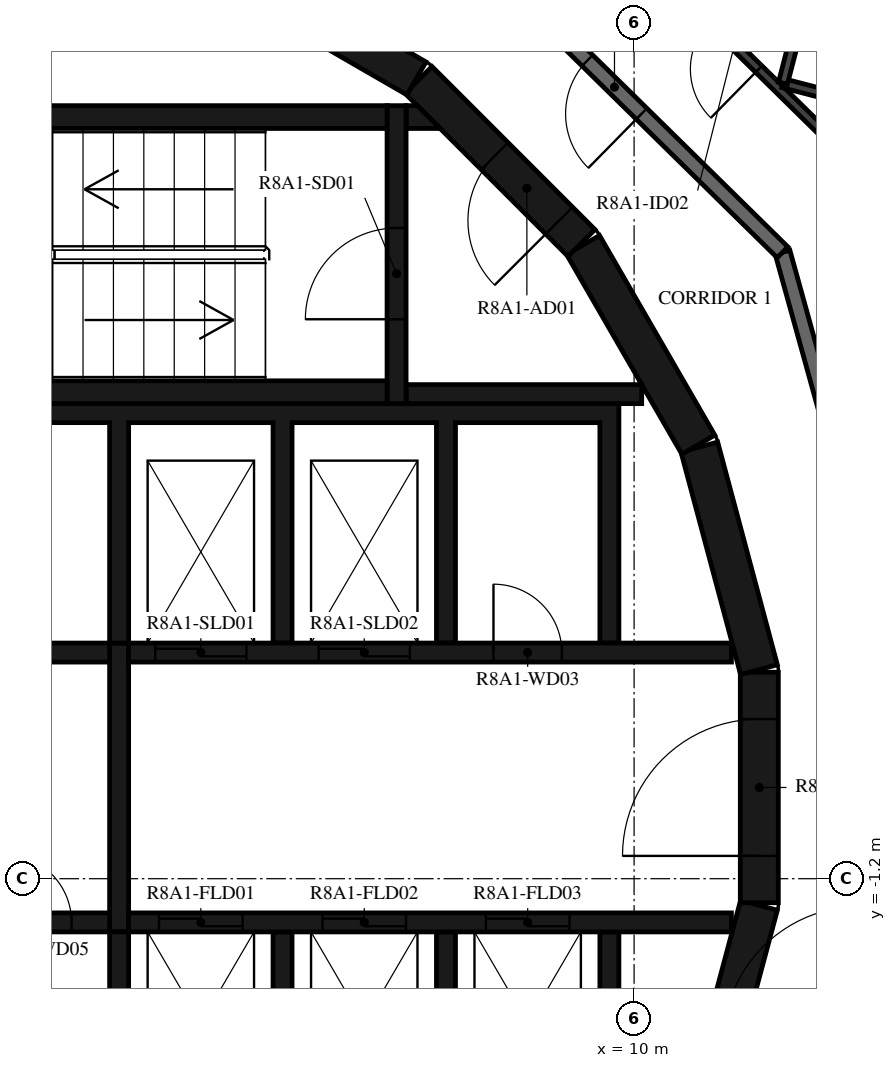
"""IFC4 building model, lengths in metres.
Left out: names, types, materials, properties, quantities, classifications, styles, units other than length and angle.
Written with IfcOpenShell. Run it as: python <this file> out.ifc"""

import sys

from ifc_helpers import new_model, si_unit, direction, frame, frame_2d, origin, place, context, subcontext, project, spatial, polyline, rectangle, outline, extrude, element, fill, save


model = new_model("IFC4")
c1 = context("Model", 3, precision=1e-05, world=origin(), true_north=direction((0.0, 1.0)))
c2 = subcontext(c1, "Body", "Model", "MODEL_VIEW")
j1 = project(units=[si_unit("LENGTHUNIT", "METRE"), si_unit("PLANEANGLEUNIT", "RADIAN")], contexts=[c1])
p1 = place(None, origin())
s1 = spatial("IfcSite", under=j1, at=p1, CompositionType="ELEMENT")
p2 = place(p1, origin())
s2 = spatial("IfcBuilding", under=s1, at=p2, CompositionType="ELEMENT")
p3 = place(p2, frame((0.0, 0.0, 301.7)))
s3 = spatial("IfcBuildingStorey", under=s2, at=p3, CompositionType="ELEMENT", Elevation=301.7)
p4 = place(p3, frame((10.858, -4.479, 0.0), z_axis=(0.0, 0.0, 1.0), x_axis=(0.258734743916, 0.965948410781, 0.0)))
e1 = element("IfcWall", 1, at=p4, inside=s3, PredefinedType="SHEAR", context=c2, shape_type="SweptSolid", body=[
    extrude(rectangle(XDim=3.033, YDim=0.5, at=frame_2d((1.516, 0.0))), origin(), (0.0, 0.0, 1.0), 3.12),
])
p5 = place(p3, frame((11.647, -1.516, 0.0), z_axis=(0.0, 0.0, 1.0), x_axis=(0.0, 1.0, 0.0)))
e2 = element("IfcWall", 2, at=p5, inside=s3, PredefinedType="SHEAR", context=c2, shape_type="SweptSolid", body=[
    extrude(rectangle(XDim=3.033, YDim=0.5, at=frame_2d((1.516, 0.0))), origin(), (0.0, 0.0, 1.0), 3.12),
])
p6 = place(p5, frame((0.616, 0.0, 0.0)))
e3 = element("IfcOpeningElement", 3, at=p6, cuts=e2, PredefinedType="OPENING", context=c2, shape_type="SweptSolid", body=[
    extrude(rectangle(XDim=1.8, YDim=2.1, at=frame_2d((0.9, 1.05))), frame((0.0, 0.26, 0.0), z_axis=(0.0, -1.0, 0.0), x_axis=(1.0, 0.0, 0.0)), (0.0, 0.0, 1.0), 0.52),
])
for number, where, z_axis, x_axis in (
    (4, (11.643, 1.55, 0.0), (0.0, 0.0, 1.0), (-0.259, 0.966, 0.0)),
    (5, (10.845, 4.51, 0.0), (0.0, 0.0, 1.0), (-0.5, 0.866, 0.0)),
):
    element("IfcWall", number, at=place(p3, frame(where, z_axis=z_axis, x_axis=x_axis)), inside=s3, PredefinedType="SHEAR", context=c2, shape_type="SweptSolid", body=[
        extrude(rectangle(XDim=3.033, YDim=0.5, at=frame_2d((1.516, 0.0))), origin(), (0.0, 0.0, 1.0), 3.12),
    ])
p7 = place(p3, frame((9.308, 7.164, 0.0), z_axis=(0.0, 0.0, 1.0), x_axis=(-0.707106781187, 0.707106781187, 0.0)))
e6 = element("IfcWall", 6, at=p7, inside=s3, PredefinedType="SHEAR", context=c2, shape_type="SweptSolid", body=[
    extrude(rectangle(XDim=3.032, YDim=0.5, at=frame_2d((1.516, 0.0))), origin(), (0.0, 0.0, 1.0), 3.12),
])
p8 = place(p7, frame((0.416, 0.0, 0.0)))
e7 = element("IfcOpeningElement", 7, at=p8, cuts=e6, PredefinedType="OPENING", context=c2, shape_type="SweptSolid", body=[
    extrude(rectangle(XDim=1.2, YDim=2.1, at=frame_2d((0.6, 1.05))), frame((0.0, 0.26, 0.0), z_axis=(0.0, -1.0, 0.0), x_axis=(1.0, 0.0, 0.0)), (0.0, 0.0, 1.0), 0.52),
])
p9 = place(p3, frame((7.137, 9.329, 0.0), z_axis=(0.0, 0.0, 1.0), x_axis=(-0.865975092491, 0.500087131594, 0.0)))
e8 = element("IfcWall", 8, at=p9, inside=s3, PredefinedType="SHEAR", context=c2, shape_type="SweptSolid", body=[
    extrude(rectangle(XDim=3.033, YDim=0.5, at=frame_2d((1.516, 0.0))), origin(), (0.0, 0.0, 1.0), 3.12),
])
for number, where, z_axis, x_axis in (
    (9, (0.0, 5.2, 0.0), (0.0, 0.0, 1.0), (1.0, 0.0, 0.0)),
    (10, (0.0, 8.82, 0.0), (0.0, 0.0, 1.0), (1.0, 0.0, 0.0)),
):
    element("IfcWall", number, at=place(p3, frame(where, z_axis=z_axis, x_axis=x_axis)), inside=s3, PredefinedType="SHEAR", context=c2, shape_type="SweptSolid", body=[
        extrude(rectangle(XDim=6.75, YDim=0.3, at=frame_2d((3.375, 0.0))), origin(), (0.0, 0.0, 1.0), 3.12),
    ])
p10 = place(p3, frame((6.875, 5.05, 0.0), z_axis=(0.0, 0.0, 1.0), x_axis=(0.0, 1.0, 0.0)))
e11 = element("IfcWall", 11, at=p10, inside=s3, PredefinedType="SHEAR", context=c2, shape_type="SweptSolid", body=[
    extrude(rectangle(XDim=3.92, YDim=0.25, at=frame_2d((1.96, 0.0))), origin(), (0.0, 0.0, 1.0), 3.12),
])
p11 = place(p10, frame((1.11, 0.0, 0.0)))
e12 = element("IfcOpeningElement", 12, at=p11, cuts=e11, PredefinedType="OPENING", context=c2, shape_type="SweptSolid", body=[
    extrude(rectangle(XDim=1.2, YDim=2.1, at=frame_2d((0.6, 1.05))), frame((0.0, 0.135, 0.0), z_axis=(0.0, -1.0, 0.0), x_axis=(1.0, 0.0, 0.0)), (0.0, 0.0, 1.0), 0.27),
])
p12 = place(p3, frame((7.0, 5.175, 0.0), z_axis=(0.0, 0.0, 1.0), x_axis=(1.0, 0.0, 0.0)))
e13 = element("IfcWall", 13, at=p12, inside=s3, PredefinedType="SHEAR", context=c2, shape_type="SweptSolid", body=[
    extrude(rectangle(XDim=3.1, YDim=0.25, at=frame_2d((1.55, 0.0))), origin(), (0.0, 0.0, 1.0), 3.12),
])
p13 = place(p3, origin())
e14 = element("IfcWall", 14, at=p13, inside=s3, PredefinedType="SHEAR", context=c2, shape_type="SweptSolid", body=[
    extrude(outline(polyline([(7.448, 8.67), (7.0, 8.67), (7.0, 8.97), (7.148, 8.97), (7.448, 8.67)])), origin(), (0.0, 0.0, 1.0), 3.12),
])
p14 = place(p3, origin())
e15 = element("IfcWall", 15, at=p14, inside=s3, PredefinedType="SHEAR", context=c2, shape_type="SweptSolid", body=[
    extrude(outline(polyline([(-9.8, 1.9), (-9.55, 1.9), (-9.55, 4.8), (-1.2, 4.8), (-1.2, 1.9), (-0.95, 1.9), (-0.95, 4.8), (3.1, 4.8), (3.1, 1.9), (3.35, 1.9), (3.35, 4.8), (5.25, 4.8), (5.25, 1.9), (5.5, 1.9), (5.5, 4.8), (7.4, 4.8), (7.4, 1.9), (7.65, 1.9), (7.65, 4.8), (9.55, 4.8), (9.55, 1.9), (9.8, 1.9), (9.8, 4.8), (9.8, 5.05), (-9.8, 5.05), (-9.8, 4.8), (-9.8, 1.9)])), origin(), (0.0, 0.0, 1.0), 3.12),
])
p15 = place(p3, origin())
e16 = element("IfcWall", 16, at=p15, inside=s3, PredefinedType="SHEAR", context=c2, shape_type="SweptSolid", body=[
    extrude(outline(polyline([(9.8, -5.05), (9.8, -4.8), (9.8, -1.9), (9.55, -1.9), (9.55, -4.8), (7.65, -4.8), (7.65, -1.9), (7.4, -1.9), (7.4, -4.8), (5.5, -4.8), (5.5, -1.9), (5.25, -1.9), (5.25, -4.8), (3.35, -4.8), (3.35, -1.9), (3.1, -1.9), (3.1, -4.8), (1.2, -4.8), (1.2, -1.9), (0.95, -1.9), (0.95, -4.8), (-0.95, -4.8), (-0.95, -1.9), (-1.2, -1.9), (-1.2, -4.8), (-3.1, -4.8), (-3.1, -1.9), (-3.35, -1.9), (-3.35, -4.8), (-5.25, -4.8), (-5.25, -1.9), (-5.5, -1.9), (-5.5, -4.8), (-9.55, -4.8), (-9.55, -1.9), (-9.8, -1.9), (-9.8, -4.8), (-9.8, -5.05), (9.8, -5.05)])), origin(), (0.0, 0.0, 1.0), 3.12),
])
p16 = place(p3, frame((-11.28, 1.775, 0.0), z_axis=(0.0, 0.0, 1.0), x_axis=(1.0, 0.0, 0.0)))
e17 = element("IfcWall", 17, at=p16, inside=s3, PredefinedType="SHEAR", context=c2, shape_type="SweptSolid", body=[
    extrude(rectangle(XDim=14.38, YDim=0.25, at=frame_2d((7.19, 0.0))), origin(), (0.0, 0.0, 1.0), 3.12),
])
p17 = place(p16, frame((5.455, 0.0, 0.0)))
e18 = element("IfcOpeningElement", 18, at=p17, cuts=e17, PredefinedType="OPENING", context=c2, shape_type="SweptSolid", body=[
    extrude(rectangle(XDim=0.9, YDim=2.1, at=frame_2d((0.45, 1.05))), frame((0.0, 0.135, 0.0), z_axis=(0.0, -1.0, 0.0), x_axis=(1.0, 0.0, 0.0)), (0.0, 0.0, 1.0), 0.27),
])
p18 = place(p16, frame((11.905, 0.0, 0.0)))
e19 = element("IfcOpeningElement", 19, at=p18, cuts=e17, PredefinedType="OPENING", context=c2, shape_type="SweptSolid", body=[
    extrude(rectangle(XDim=0.9, YDim=2.1, at=frame_2d((0.45, 1.05))), frame((0.0, 0.135, 0.0), z_axis=(0.0, -1.0, 0.0), x_axis=(1.0, 0.0, 0.0)), (0.0, 0.0, 1.0), 0.27),
])
p19 = place(p3, frame((3.35, 1.775, 0.0), z_axis=(0.0, 0.0, 1.0), x_axis=(1.0, 0.0, 0.0)))
e20 = element("IfcWall", 20, at=p19, inside=s3, PredefinedType="SHEAR", context=c2, shape_type="SweptSolid", body=[
    extrude(rectangle(XDim=7.93, YDim=0.25, at=frame_2d((3.965, 0.0))), origin(), (0.0, 0.0, 1.0), 3.12),
])
p20 = place(p19, frame((0.35, 0.0, 0.0)))
e21 = element("IfcOpeningElement", 21, at=p20, cuts=e20, PredefinedType="OPENING", context=c2, shape_type="SweptSolid", body=[
    extrude(rectangle(XDim=1.2, YDim=2.4, at=frame_2d((0.6, 1.2))), frame((0.0, 0.135, 0.0), z_axis=(0.0, -1.0, 0.0), x_axis=(1.0, 0.0, 0.0)), (0.0, 0.0, 1.0), 0.27),
])
p21 = place(p19, frame((2.5, 0.0, 0.0)))
e22 = element("IfcOpeningElement", 22, at=p21, cuts=e20, PredefinedType="OPENING", context=c2, shape_type="SweptSolid", body=[
    extrude(rectangle(XDim=1.2, YDim=2.4, at=frame_2d((0.6, 1.2))), frame((0.0, 0.135, 0.0), z_axis=(0.0, -1.0, 0.0), x_axis=(1.0, 0.0, 0.0)), (0.0, 0.0, 1.0), 0.27),
])
p22 = place(p19, frame((4.8, 0.0, 0.0)))
e23 = element("IfcOpeningElement", 23, at=p22, cuts=e20, PredefinedType="OPENING", context=c2, shape_type="SweptSolid", body=[
    extrude(rectangle(XDim=0.9, YDim=2.1, at=frame_2d((0.45, 1.05))), frame((0.0, 0.135, 0.0), z_axis=(0.0, -1.0, 0.0), x_axis=(1.0, 0.0, 0.0)), (0.0, 0.0, 1.0), 0.27),
])
p23 = place(p3, frame((-11.28, -1.775, 0.0), z_axis=(0.0, 0.0, 1.0), x_axis=(1.0, 0.0, 0.0)))
e24 = element("IfcWall", 24, at=p23, inside=s3, PredefinedType="SHEAR", context=c2, shape_type="SweptSolid", body=[
    extrude(rectangle(XDim=14.38, YDim=0.25, at=frame_2d((7.19, 0.0))), origin(), (0.0, 0.0, 1.0), 3.12),
])
p24 = place(p23, frame((6.43, 0.0, 0.0)))
e25 = element("IfcOpeningElement", 25, at=p24, cuts=e24, PredefinedType="OPENING", context=c2, shape_type="SweptSolid", body=[
    extrude(rectangle(XDim=1.1, YDim=2.1, at=frame_2d((0.55, 1.05))), frame((0.0, 0.135, 0.0), z_axis=(0.0, -1.0, 0.0), x_axis=(1.0, 0.0, 0.0)), (0.0, 0.0, 1.0), 0.27),
])
p25 = place(p23, frame((8.58, 0.0, 0.0)))
e26 = element("IfcOpeningElement", 26, at=p25, cuts=e24, PredefinedType="OPENING", context=c2, shape_type="SweptSolid", body=[
    extrude(rectangle(XDim=1.1, YDim=2.1, at=frame_2d((0.55, 1.05))), frame((0.0, 0.135, 0.0), z_axis=(0.0, -1.0, 0.0), x_axis=(1.0, 0.0, 0.0)), (0.0, 0.0, 1.0), 0.27),
])
p26 = place(p23, frame((10.73, 0.0, 0.0)))
e27 = element("IfcOpeningElement", 27, at=p26, cuts=e24, PredefinedType="OPENING", context=c2, shape_type="SweptSolid", body=[
    extrude(rectangle(XDim=1.1, YDim=2.1, at=frame_2d((0.55, 1.05))), frame((0.0, 0.135, 0.0), z_axis=(0.0, -1.0, 0.0), x_axis=(1.0, 0.0, 0.0)), (0.0, 0.0, 1.0), 0.27),
])
p27 = place(p23, frame((3.305, 0.0, 0.0)))
e28 = element("IfcOpeningElement", 28, at=p27, cuts=e24, PredefinedType="OPENING", context=c2, shape_type="SweptSolid", body=[
    extrude(rectangle(XDim=0.9, YDim=2.1, at=frame_2d((0.45, 1.05))), frame((0.0, 0.135, 0.0), z_axis=(0.0, -1.0, 0.0), x_axis=(1.0, 0.0, 0.0)), (0.0, 0.0, 1.0), 0.27),
])
p28 = place(p23, frame((12.98, 0.0, 0.0)))
e29 = element("IfcOpeningElement", 29, at=p28, cuts=e24, PredefinedType="OPENING", context=c2, shape_type="SweptSolid", body=[
    extrude(rectangle(XDim=0.9, YDim=2.1, at=frame_2d((0.45, 1.05))), frame((0.0, 0.135, 0.0), z_axis=(0.0, -1.0, 0.0), x_axis=(1.0, 0.0, 0.0)), (0.0, 0.0, 1.0), 0.27),
])
p29 = place(p3, frame((3.35, -1.775, 0.0), z_axis=(0.0, 0.0, 1.0), x_axis=(1.0, 0.0, 0.0)))
e30 = element("IfcWall", 30, at=p29, inside=s3, PredefinedType="SHEAR", context=c2, shape_type="SweptSolid", body=[
    extrude(rectangle(XDim=7.93, YDim=0.25, at=frame_2d((3.965, 0.0))), origin(), (0.0, 0.0, 1.0), 3.12),
])
p30 = place(p29, frame((0.4, 0.0, 0.0)))
e31 = element("IfcOpeningElement", 31, at=p30, cuts=e30, PredefinedType="OPENING", context=c2, shape_type="SweptSolid", body=[
    extrude(rectangle(XDim=1.1, YDim=2.4, at=frame_2d((0.55, 1.2))), frame((0.0, 0.135, 0.0), z_axis=(0.0, -1.0, 0.0), x_axis=(1.0, 0.0, 0.0)), (0.0, 0.0, 1.0), 0.27),
])
p31 = place(p29, frame((2.55, 0.0, 0.0)))
e32 = element("IfcOpeningElement", 32, at=p31, cuts=e30, PredefinedType="OPENING", context=c2, shape_type="SweptSolid", body=[
    extrude(rectangle(XDim=1.1, YDim=2.4, at=frame_2d((0.55, 1.2))), frame((0.0, 0.135, 0.0), z_axis=(0.0, -1.0, 0.0), x_axis=(1.0, 0.0, 0.0)), (0.0, 0.0, 1.0), 0.27),
])
p32 = place(p29, frame((4.7, 0.0, 0.0)))
e33 = element("IfcOpeningElement", 33, at=p32, cuts=e30, PredefinedType="OPENING", context=c2, shape_type="SweptSolid", body=[
    extrude(rectangle(XDim=1.1, YDim=2.4, at=frame_2d((0.55, 1.2))), frame((0.0, 0.135, 0.0), z_axis=(0.0, -1.0, 0.0), x_axis=(1.0, 0.0, 0.0)), (0.0, 0.0, 1.0), 0.27),
])
p33 = place(p3, frame((3.225, -1.9, 0.0), z_axis=(0.0, 0.0, 1.0), x_axis=(0.0, 1.0, 0.0)))
e34 = element("IfcWall", 34, at=p33, inside=s3, PredefinedType="SHEAR", context=c2, shape_type="SweptSolid", body=[
    extrude(rectangle(XDim=3.8, YDim=0.25, at=frame_2d((1.9, 0.0))), origin(), (0.0, 0.0, 1.0), 3.12),
])
p34 = place(p3, frame((12.074, -6.831, 0.0), z_axis=(0.0, 0.0, 1.0), x_axis=(0.250391063186, 0.968144780225, 0.0)))
e35 = element("IfcWall", 35, at=p34, inside=s3, PredefinedType="STANDARD", context=c2, shape_type="SweptSolid", body=[
    extrude(rectangle(XDim=7.181, YDim=0.2, at=frame_2d((3.591, 0.0))), origin(), (0.0, 0.0, 1.0), 3.12),
])
p35 = place(p34, frame((3.581, 0.0, 0.0)))
e36 = element("IfcOpeningElement", 36, at=p35, cuts=e35, PredefinedType="OPENING", context=c2, shape_type="SweptSolid", body=[
    extrude(rectangle(XDim=1.8, YDim=2.1, at=frame_2d((0.9, 1.05))), frame((0.0, 0.11, 0.0), z_axis=(0.0, -1.0, 0.0), x_axis=(1.0, 0.0, 0.0)), (0.0, 0.0, 1.0), 0.22),
])
p36 = place(p3, frame((12.913, 3.581, 0.0), z_axis=(0.0, 0.0, 1.0), x_axis=(-0.267223005422, 0.963634715737, 0.0)))
e37 = element("IfcWall", 37, at=p36, inside=s3, PredefinedType="STANDARD", context=c2, shape_type="SweptSolid", body=[
    extrude(rectangle(XDim=3.591, YDim=0.2, at=frame_2d((1.795, 0.0))), origin(), (0.0, 0.0, 1.0), 3.12),
])
p37 = place(p3, frame((11.953, 7.041, 0.0), z_axis=(0.0, 0.0, 1.0), x_axis=(-0.713250549143, 0.70090916255, 0.0)))
e38 = element("IfcWall", 38, at=p37, inside=s3, PredefinedType="STANDARD", context=c2, shape_type="SweptSolid", body=[
    extrude(rectangle(XDim=7.181, YDim=0.2, at=frame_2d((3.59, 0.0))), origin(), (0.0, 0.0, 1.0), 3.12),
])
p38 = place(p37, frame((2.6, 0.0, 0.0)))
e39 = element("IfcOpeningElement", 39, at=p38, cuts=e38, PredefinedType="OPENING", context=c2, shape_type="SweptSolid", body=[
    extrude(rectangle(XDim=1.0, YDim=2.1, at=frame_2d((0.5, 1.05))), frame((0.0, 0.11, 0.0), z_axis=(0.0, -1.0, 0.0), x_axis=(1.0, 0.0, 0.0)), (0.0, 0.0, 1.0), 0.22),
])
p39 = place(p3, frame((13.291, 7.829, 0.0), z_axis=(0.0, 0.0, 1.0), x_axis=(-0.713255978622, 0.700903637428, 0.0)))
e40 = element("IfcWall", 40, at=p39, inside=s3, PredefinedType="PARTITIONING", context=c2, shape_type="SweptSolid", body=[
    extrude(rectangle(XDim=7.985, YDim=0.12, at=frame_2d((3.992, 0.0))), origin(), (0.0, 0.0, 1.0), 3.12),
])
p40 = place(p39, frame((2.314, 0.0, 0.0)))
e41 = element("IfcOpeningElement", 41, at=p40, cuts=e40, PredefinedType="OPENING", context=c2, shape_type="SweptSolid", body=[
    extrude(rectangle(XDim=0.9, YDim=2.1, at=frame_2d((0.45, 1.05))), frame((0.0, 0.07, 0.0), z_axis=(0.0, -1.0, 0.0), x_axis=(1.0, 0.0, 0.0)), (0.0, 0.0, 1.0), 0.14),
])
p41 = place(p3, frame((18.071, 7.685, 0.0), z_axis=(0.0, 0.0, 1.0), x_axis=(-0.968152245082, 0.250362198309, 0.0)))
e42 = element("IfcWall", 42, at=p41, inside=s3, PredefinedType="PARTITIONING", context=c2, shape_type="SweptSolid", body=[
    extrude(rectangle(XDim=6.313, YDim=0.12, at=frame_2d((3.157, 0.0))), origin(), (0.0, 0.0, 1.0), 3.12),
])
p42 = place(p41, frame((3.036, 0.0, 0.0)))
e43 = element("IfcOpeningElement", 43, at=p42, cuts=e42, PredefinedType="OPENING", context=c2, shape_type="SweptSolid", body=[
    extrude(rectangle(XDim=0.9, YDim=2.1, at=frame_2d((0.45, 1.05))), frame((0.0, 0.07, 0.0), z_axis=(0.0, -1.0, 0.0), x_axis=(1.0, 0.0, 0.0)), (0.0, 0.0, 1.0), 0.14),
])
p43 = place(p3, frame((13.26, 14.3, 0.0), z_axis=(0.0, 0.0, 1.0), x_axis=(-0.25038206324, -0.968147107834, 0.0)))
e44 = element("IfcWall", 44, at=p43, inside=s3, PredefinedType="PARTITIONING", context=c2, shape_type="SweptSolid", body=[
    extrude(rectangle(XDim=5.2, YDim=0.12, at=frame_2d((2.6, 0.0))), origin(), (0.0, 0.0, 1.0), 2.73),
])
p44 = place(p11, origin())
e45 = element("IfcDoor", 45, at=p44, inside=s3, OperationType="SINGLE_SWING_LEFT", PredefinedType="DOOR", context=c2, shape_type="SweptSolid", body=[
    extrude(rectangle(XDim=1.2, YDim=2.1, at=frame_2d((0.6, 1.05))), frame((0.0, 0.025, 0.0), z_axis=(0.0, -1.0, 0.0), x_axis=(1.0, 0.0, 0.0)), (0.0, 0.0, 1.0), 0.05),
])
fill(e12, e45)
p45 = place(p8, origin())
e46 = element("IfcDoor", 46, at=p45, inside=s3, OperationType="SINGLE_SWING_RIGHT", PredefinedType="DOOR", context=c2, shape_type="SweptSolid", body=[
    extrude(rectangle(XDim=1.2, YDim=2.1, at=frame_2d((0.6, 1.05))), frame((0.0, 0.025, 0.0), z_axis=(0.0, -1.0, 0.0), x_axis=(1.0, 0.0, 0.0)), (0.0, 0.0, 1.0), 0.05),
])
fill(e7, e46)
p46 = place(p6, origin())
e47 = element("IfcDoor", 47, at=p46, inside=s3, OperationType="DOUBLE_DOOR_SINGLE_SWING", PredefinedType="DOOR", context=c2, shape_type="SweptSolid", body=[
    extrude(rectangle(XDim=1.8, YDim=2.1, at=frame_2d((0.9, 1.05))), frame((0.0, 0.025, 0.0), z_axis=(0.0, -1.0, 0.0), x_axis=(1.0, 0.0, 0.0)), (0.0, 0.0, 1.0), 0.05),
])
fill(e3, e47)
p47 = place(p20, origin())
e48 = element("IfcDoor", 48, at=p47, inside=s3, OperationType="DOUBLE_DOOR_SLIDING", PredefinedType="DOOR", context=c2, shape_type="SweptSolid", body=[
    extrude(rectangle(XDim=1.2, YDim=2.4, at=frame_2d((0.6, 1.2))), frame((0.0, 0.025, 0.0), z_axis=(0.0, -1.0, 0.0), x_axis=(1.0, 0.0, 0.0)), (0.0, 0.0, 1.0), 0.05),
])
fill(e21, e48)
p48 = place(p21, origin())
e49 = element("IfcDoor", 49, at=p48, inside=s3, OperationType="DOUBLE_DOOR_SLIDING", PredefinedType="DOOR", context=c2, shape_type="SweptSolid", body=[
    extrude(rectangle(XDim=1.2, YDim=2.4, at=frame_2d((0.6, 1.2))), frame((0.0, 0.025, 0.0), z_axis=(0.0, -1.0, 0.0), x_axis=(1.0, 0.0, 0.0)), (0.0, 0.0, 1.0), 0.05),
])
fill(e22, e49)
p49 = place(p30, origin())
e50 = element("IfcDoor", 50, at=p49, inside=s3, OperationType="DOUBLE_DOOR_SLIDING", PredefinedType="DOOR", context=c2, shape_type="SweptSolid", body=[
    extrude(rectangle(XDim=1.1, YDim=2.4, at=frame_2d((0.55, 1.2))), frame((0.0, 0.025, 0.0), z_axis=(0.0, -1.0, 0.0), x_axis=(1.0, 0.0, 0.0)), (0.0, 0.0, 1.0), 0.05),
])
fill(e31, e50)
p50 = place(p31, origin())
e51 = element("IfcDoor", 51, at=p50, inside=s3, OperationType="DOUBLE_DOOR_SLIDING", PredefinedType="DOOR", context=c2, shape_type="SweptSolid", body=[
    extrude(rectangle(XDim=1.1, YDim=2.4, at=frame_2d((0.55, 1.2))), frame((0.0, 0.025, 0.0), z_axis=(0.0, -1.0, 0.0), x_axis=(1.0, 0.0, 0.0)), (0.0, 0.0, 1.0), 0.05),
])
fill(e32, e51)
p51 = place(p32, origin())
e52 = element("IfcDoor", 52, at=p51, inside=s3, OperationType="DOUBLE_DOOR_SLIDING", PredefinedType="DOOR", context=c2, shape_type="SweptSolid", body=[
    extrude(rectangle(XDim=1.1, YDim=2.4, at=frame_2d((0.55, 1.2))), frame((0.0, 0.025, 0.0), z_axis=(0.0, -1.0, 0.0), x_axis=(1.0, 0.0, 0.0)), (0.0, 0.0, 1.0), 0.05),
])
fill(e33, e52)
p52 = place(p22, origin())
e53 = element("IfcDoor", 53, at=p52, inside=s3, OperationType="SINGLE_SWING_LEFT", PredefinedType="DOOR", context=c2, shape_type="SweptSolid", body=[
    extrude(rectangle(XDim=0.9, YDim=2.1, at=frame_2d((0.45, 1.05))), frame((0.0, 0.025, 0.0), z_axis=(0.0, -1.0, 0.0), x_axis=(1.0, 0.0, 0.0)), (0.0, 0.0, 1.0), 0.05),
])
fill(e23, e53)
p53 = place(p28, origin())
e54 = element("IfcDoor", 54, at=p53, inside=s3, OperationType="SINGLE_SWING_LEFT", PredefinedType="DOOR", context=c2, shape_type="SweptSolid", body=[
    extrude(rectangle(XDim=0.9, YDim=2.1, at=frame_2d((0.45, 1.05))), frame((0.0, 0.025, 0.0), z_axis=(0.0, -1.0, 0.0), x_axis=(1.0, 0.0, 0.0)), (0.0, 0.0, 1.0), 0.05),
])
fill(e29, e54)
p54 = place(p38, origin())
e55 = element("IfcDoor", 55, at=p54, inside=s3, OperationType="SINGLE_SWING_LEFT", PredefinedType="DOOR", context=c2, shape_type="SweptSolid", body=[
    extrude(rectangle(XDim=1.0, YDim=2.1, at=frame_2d((0.5, 1.05))), frame((0.0, 0.025, 0.0), z_axis=(0.0, -1.0, 0.0), x_axis=(1.0, 0.0, 0.0)), (0.0, 0.0, 1.0), 0.05),
])
fill(e39, e55)
p55 = place(p40, origin())
e56 = element("IfcDoor", 56, at=p55, inside=s3, OperationType="SINGLE_SWING_LEFT", PredefinedType="DOOR", context=c2, shape_type="SweptSolid", body=[
    extrude(rectangle(XDim=0.9, YDim=2.1, at=frame_2d((0.45, 1.05))), frame((0.0, 0.025, 0.0), z_axis=(0.0, -1.0, 0.0), x_axis=(1.0, 0.0, 0.0)), (0.0, 0.0, 1.0), 0.05),
])
fill(e41, e56)
save(model, sys.argv[1])
